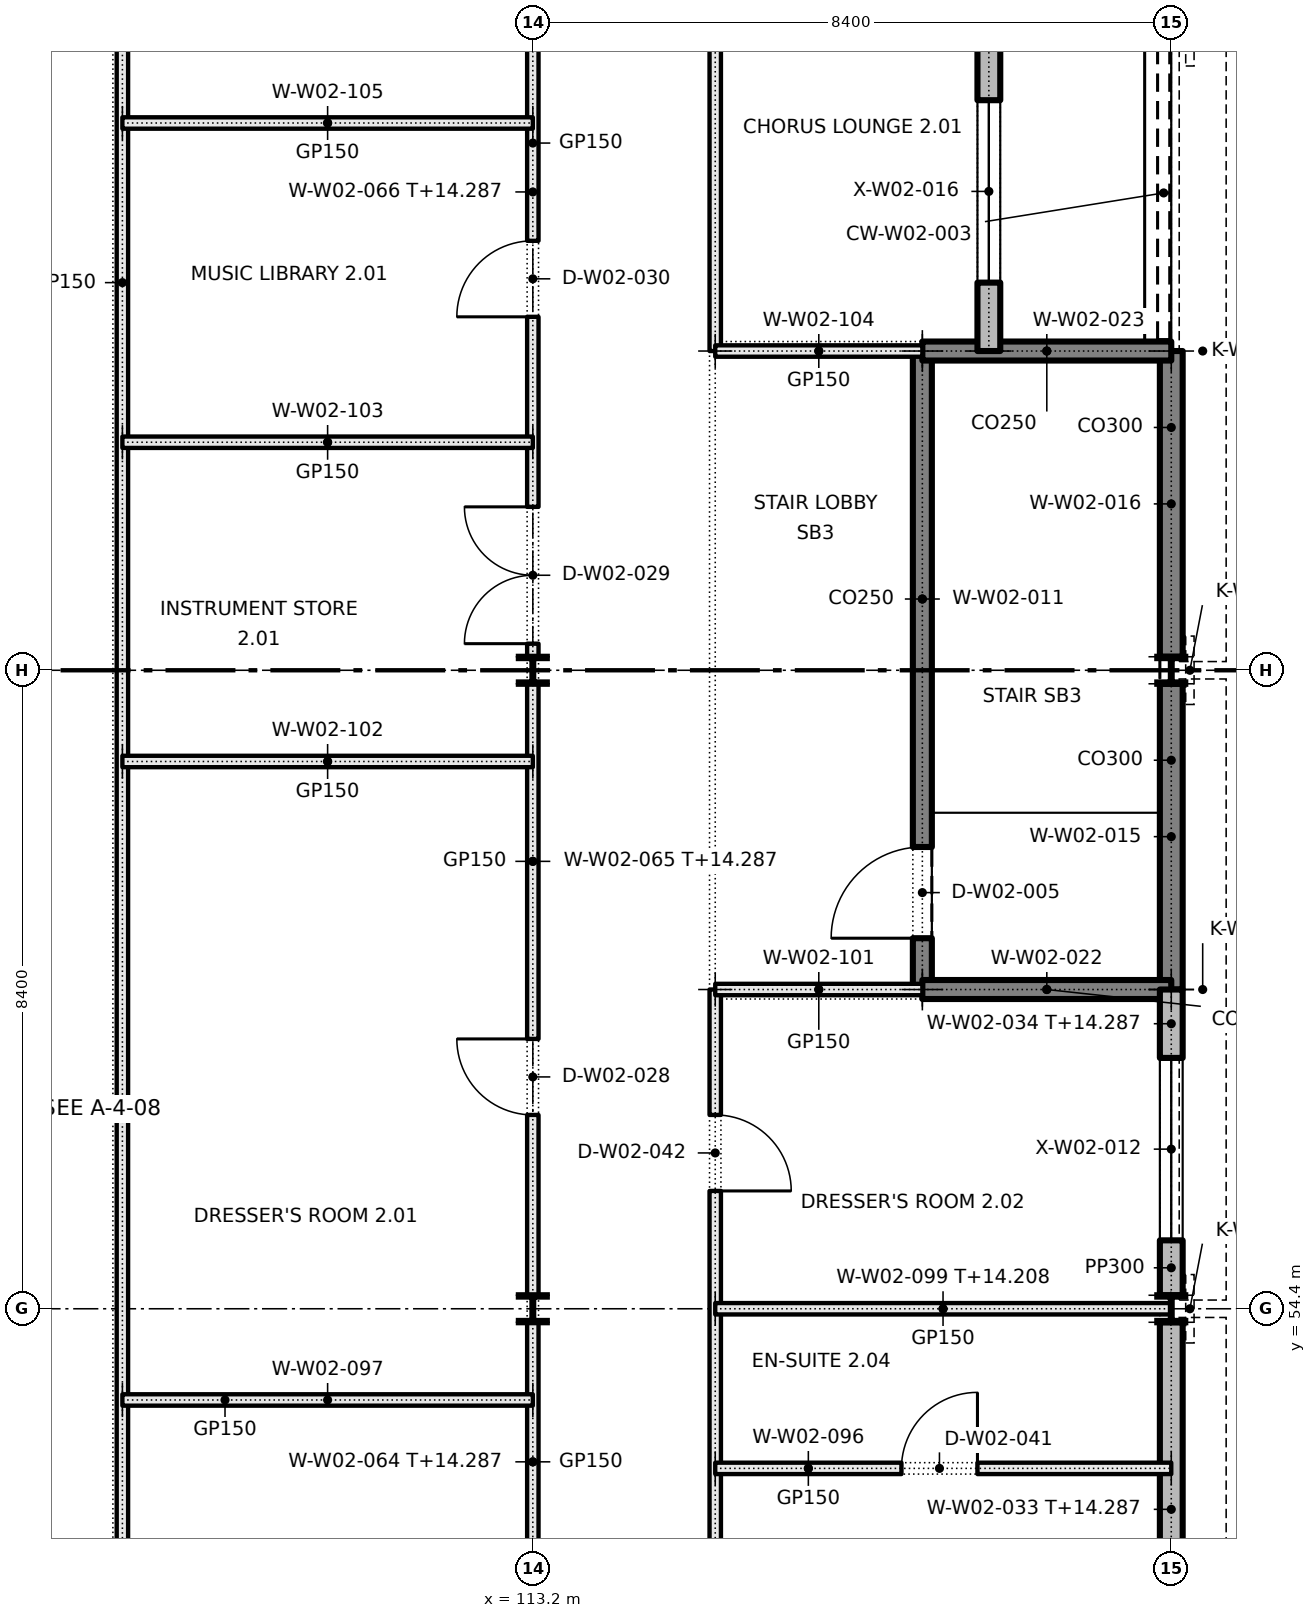
"""IFC4 building model, lengths in metres.
Left out: names, types, materials, properties, quantities, classifications, styles, units other than length and angle.
Written with IfcOpenShell. Run it as: python <this file> out.ifc"""

import sys

from ifc_helpers import new_model, si_unit, direction, frame, frame_2d, origin, origin_2d, place, context, subcontext, project, spatial, rectangle, i_section, extrude, element, fill, save


model = new_model("IFC4")
c1 = context("Model", 3, precision=1e-05, world=origin(), true_north=direction((0.0, 1.0)))
c2 = subcontext(c1, "Body", "Model", "MODEL_VIEW")
j1 = project(units=[si_unit("LENGTHUNIT", "METRE"), si_unit("PLANEANGLEUNIT", "RADIAN")], contexts=[c1])
p1 = place(None, origin())
s1 = spatial("IfcSite", under=j1, at=p1, CompositionType="ELEMENT")
p2 = place(p1, origin())
s2 = spatial("IfcBuilding", under=s1, at=p2, CompositionType="ELEMENT")
p3 = place(p2, frame((0.0, 0.0, 10.2)))
s3 = spatial("IfcBuildingStorey", under=s2, at=p3, CompositionType="ELEMENT", Elevation=10.2)
for number, where, z_axis, x_axis in (
    (1, (113.2, 54.4, 0.0), (0.0, 0.0, 1.0), (1.0, 0.0, 0.0)),
    (2, (113.2, 62.8, 0.0), (0.0, 0.0, 1.0), (1.0, 0.0, 0.0)),
    (3, (121.6, 54.4, 0.0), (0.0, 0.0, 1.0), (1.0, 0.0, 0.0)),
    (4, (121.6, 62.8, 0.0), (0.0, 0.0, 1.0), (1.0, 0.0, 0.0)),
):
    element("IfcColumn", number, at=place(p3, frame(where, z_axis=z_axis, x_axis=x_axis)), inside=s3, PredefinedType="COLUMN", context=c2, shape_type="SweptSolid", body=[
        extrude(i_section(OverallWidth=0.368, OverallDepth=0.356, WebThickness=0.011, FlangeThickness=0.018, FilletRadius=0.015, at=origin_2d()), origin(), (0.0, 0.0, 1.0), 4.8),
    ])
p4 = place(p3, frame((118.325, 58.6, 0.0), z_axis=(0.0, 0.0, 1.0), x_axis=(0.0, 1.0, 0.0)))
e5 = element("IfcWall", 5, at=p4, inside=s3, PredefinedType="SHEAR", context=c2, shape_type="SweptSolid", body=[
    extrude(rectangle(XDim=8.4, YDim=0.25, at=frame_2d((4.2, 0.0))), origin(), (0.0, 0.0, 1.0), 4.8),
])
p5 = place(p4, frame((0.675, 0.0, 0.0)))
e6 = element("IfcOpeningElement", 6, at=p5, cuts=e5, PredefinedType="OPENING", context=c2, shape_type="SweptSolid", body=[
    extrude(rectangle(XDim=1.2, YDim=2.1, at=frame_2d((0.6, 1.05))), frame((0.0, 0.135, 0.0), z_axis=(0.0, -1.0, 0.0), x_axis=(1.0, 0.0, 0.0)), (0.0, 0.0, 1.0), 0.27),
])
for number, where, z_axis, x_axis in (
    (7, (121.6, 58.6, 0.0), (0.0, 0.0, 1.0), (0.0, 1.0, 0.0)),
    (8, (121.6, 62.978, 0.0), (0.0, 0.0, 1.0), (0.0, 1.0, 0.0)),
):
    element("IfcWall", number, at=place(p3, frame(where, z_axis=z_axis, x_axis=x_axis)), inside=s3, PredefinedType="SHEAR", context=c2, shape_type="SweptSolid", body=[
        extrude(rectangle(XDim=4.022, YDim=0.3, at=frame_2d((2.011, 0.0))), origin(), (0.0, 0.0, 1.0), 4.8),
    ])
for number, where, z_axis, x_axis in (
    (9, (118.325, 58.6, 0.0), (0.0, 0.0, 1.0), (1.0, 0.0, 0.0)),
    (10, (118.325, 67.0, 0.0), (0.0, 0.0, 1.0), (1.0, 0.0, 0.0)),
):
    element("IfcWall", number, at=place(p3, frame(where, z_axis=z_axis, x_axis=x_axis)), inside=s3, PredefinedType="SHEAR", context=c2, shape_type="SweptSolid", body=[
        extrude(rectangle(XDim=3.275, YDim=0.25, at=frame_2d((1.638, 0.0))), origin(), (0.0, 0.0, 1.0), 4.8),
    ])
p6 = place(p3, frame((121.6, 46.178, 0.0), z_axis=(0.0, 0.0, 1.0), x_axis=(0.0, 1.0, 0.0)))
e11 = element("IfcWall", 11, at=p6, inside=s3, PredefinedType="SOLIDWALL", context=c2, shape_type="SweptSolid", body=[
    extrude(rectangle(XDim=8.044, YDim=0.3, at=frame_2d((4.022, 0.0))), origin(), (0.0, 0.0, 1.0), 4.087),
])
p7 = place(p6, frame((0.722, 0.0, 0.95)))
e12 = element("IfcOpeningElement", 12, at=p7, cuts=e11, PredefinedType="OPENING", context=c2, shape_type="SweptSolid", body=[
    extrude(rectangle(XDim=2.4, YDim=1.8, at=frame_2d((1.2, 0.9))), frame((0.0, 0.16, 0.0), z_axis=(0.0, -1.0, 0.0), x_axis=(1.0, 0.0, 0.0)), (0.0, 0.0, 1.0), 0.32),
])
p8 = place(p3, frame((121.6, 54.578, 0.0), z_axis=(0.0, 0.0, 1.0), x_axis=(0.0, 1.0, 0.0)))
e13 = element("IfcWall", 13, at=p8, inside=s3, PredefinedType="SOLIDWALL", context=c2, shape_type="SweptSolid", body=[
    extrude(rectangle(XDim=4.022, YDim=0.3, at=frame_2d((2.011, 0.0))), origin(), (0.0, 0.0, 1.0), 4.087),
])
p9 = place(p8, frame((0.722, 0.0, 0.95)))
e14 = element("IfcOpeningElement", 14, at=p9, cuts=e13, PredefinedType="OPENING", context=c2, shape_type="SweptSolid", body=[
    extrude(rectangle(XDim=2.4, YDim=1.8, at=frame_2d((1.2, 0.9))), frame((0.0, 0.16, 0.0), z_axis=(0.0, -1.0, 0.0), x_axis=(1.0, 0.0, 0.0)), (0.0, 0.0, 1.0), 0.32),
])
p10 = place(p3, frame((107.8, 36.4, 0.0), z_axis=(0.0, 0.0, 1.0), x_axis=(0.0, 1.0, 0.0)))
e15 = element("IfcWall", 15, at=p10, inside=s3, PredefinedType="PARTITIONING", context=c2, shape_type="SweptSolid", body=[
    extrude(rectangle(XDim=42.0, YDim=0.15, at=frame_2d((21.0, 0.0))), origin(), (0.0, 0.0, 1.0), 4.8),
])
p11 = place(p3, frame((113.2, 46.178, 0.0), z_axis=(0.0, 0.0, 1.0), x_axis=(0.0, 1.0, 0.0)))
e16 = element("IfcWall", 16, at=p11, inside=s3, PredefinedType="PARTITIONING", context=c2, shape_type="SweptSolid", body=[
    extrude(rectangle(XDim=8.044, YDim=0.15, at=frame_2d((4.022, 0.0))), origin(), (0.0, 0.0, 1.0), 4.087),
])
p12 = place(p11, frame((3.372, 0.0, 0.0)))
e17 = element("IfcOpeningElement", 17, at=p12, cuts=e16, PredefinedType="OPENING", context=c2, shape_type="SweptSolid", body=[
    extrude(rectangle(XDim=1.0, YDim=2.1, at=frame_2d((0.5, 1.05))), frame((0.0, 0.085, 0.0), z_axis=(0.0, -1.0, 0.0), x_axis=(1.0, 0.0, 0.0)), (0.0, 0.0, 1.0), 0.17),
])
p13 = place(p3, frame((113.2, 54.578, 0.0), z_axis=(0.0, 0.0, 1.0), x_axis=(0.0, 1.0, 0.0)))
e18 = element("IfcWall", 18, at=p13, inside=s3, PredefinedType="PARTITIONING", context=c2, shape_type="SweptSolid", body=[
    extrude(rectangle(XDim=8.044, YDim=0.15, at=frame_2d((4.022, 0.0))), origin(), (0.0, 0.0, 1.0), 4.087),
])
p14 = place(p13, frame((2.372, 0.0, 0.0)))
e19 = element("IfcOpeningElement", 19, at=p14, cuts=e18, PredefinedType="OPENING", context=c2, shape_type="SweptSolid", body=[
    extrude(rectangle(XDim=1.0, YDim=2.1, at=frame_2d((0.5, 1.05))), frame((0.0, 0.085, 0.0), z_axis=(0.0, -1.0, 0.0), x_axis=(1.0, 0.0, 0.0)), (0.0, 0.0, 1.0), 0.17),
])
p15 = place(p3, frame((113.2, 62.978, 0.0), z_axis=(0.0, 0.0, 1.0), x_axis=(0.0, 1.0, 0.0)))
e20 = element("IfcWall", 20, at=p15, inside=s3, PredefinedType="PARTITIONING", context=c2, shape_type="SweptSolid", body=[
    extrude(rectangle(XDim=8.044, YDim=0.15, at=frame_2d((4.022, 0.0))), origin(), (0.0, 0.0, 1.0), 4.087),
])
p16 = place(p15, frame((0.172, 0.0, 0.0)))
e21 = element("IfcOpeningElement", 21, at=p16, cuts=e20, PredefinedType="OPENING", context=c2, shape_type="SweptSolid", body=[
    extrude(rectangle(XDim=1.8, YDim=2.1, at=frame_2d((0.9, 1.05))), frame((0.0, 0.085, 0.0), z_axis=(0.0, -1.0, 0.0), x_axis=(1.0, 0.0, 0.0)), (0.0, 0.0, 1.0), 0.17),
])
p17 = place(p15, frame((4.472, 0.0, 0.0)))
e22 = element("IfcOpeningElement", 22, at=p17, cuts=e20, PredefinedType="OPENING", context=c2, shape_type="SweptSolid", body=[
    extrude(rectangle(XDim=1.0, YDim=2.1, at=frame_2d((0.5, 1.05))), frame((0.0, 0.085, 0.0), z_axis=(0.0, -1.0, 0.0), x_axis=(1.0, 0.0, 0.0)), (0.0, 0.0, 1.0), 0.17),
])
p18 = place(p3, frame((115.6, 37.6, 0.0), z_axis=(0.0, 0.0, 1.0), x_axis=(0.0, 1.0, 0.0)))
e23 = element("IfcWall", 23, at=p18, inside=s3, PredefinedType="PARTITIONING", context=c2, shape_type="SweptSolid", body=[
    extrude(rectangle(XDim=21.0, YDim=0.15, at=frame_2d((10.5, 0.0))), origin(), (0.0, 0.0, 1.0), 4.8),
])
p19 = place(p18, frame((2.65, 0.0, 0.0)))
e24 = element("IfcOpeningElement", 24, at=p19, cuts=e23, PredefinedType="OPENING", context=c2, shape_type="SweptSolid", body=[
    extrude(rectangle(XDim=1.0, YDim=2.1, at=frame_2d((0.5, 1.05))), frame((0.0, 0.085, 0.0), z_axis=(0.0, -1.0, 0.0), x_axis=(1.0, 0.0, 0.0)), (0.0, 0.0, 1.0), 0.17),
])
p20 = place(p18, frame((11.05, 0.0, 0.0)))
e25 = element("IfcOpeningElement", 25, at=p20, cuts=e23, PredefinedType="OPENING", context=c2, shape_type="SweptSolid", body=[
    extrude(rectangle(XDim=1.0, YDim=2.1, at=frame_2d((0.5, 1.05))), frame((0.0, 0.085, 0.0), z_axis=(0.0, -1.0, 0.0), x_axis=(1.0, 0.0, 0.0)), (0.0, 0.0, 1.0), 0.17),
])
p21 = place(p18, frame((18.35, 0.0, 0.0)))
e26 = element("IfcOpeningElement", 26, at=p21, cuts=e23, PredefinedType="OPENING", context=c2, shape_type="SweptSolid", body=[
    extrude(rectangle(XDim=1.0, YDim=2.1, at=frame_2d((0.5, 1.05))), frame((0.0, 0.085, 0.0), z_axis=(0.0, -1.0, 0.0), x_axis=(1.0, 0.0, 0.0)), (0.0, 0.0, 1.0), 0.17),
])
p22 = place(p3, frame((115.6, 67.0, 0.0), z_axis=(0.0, 0.0, 1.0), x_axis=(0.0, 1.0, 0.0)))
e27 = element("IfcWall", 27, at=p22, inside=s3, PredefinedType="PARTITIONING", context=c2, shape_type="SweptSolid", body=[
    extrude(rectangle(XDim=21.0, YDim=0.15, at=frame_2d((10.5, 0.0))), origin(), (0.0, 0.0, 1.0), 4.8),
])
p23 = place(p22, frame((9.95, 0.0, 0.0)))
e28 = element("IfcOpeningElement", 28, at=p23, cuts=e27, PredefinedType="OPENING", context=c2, shape_type="SweptSolid", body=[
    extrude(rectangle(XDim=1.0, YDim=2.1, at=frame_2d((0.5, 1.05))), frame((0.0, 0.085, 0.0), z_axis=(0.0, -1.0, 0.0), x_axis=(1.0, 0.0, 0.0)), (0.0, 0.0, 1.0), 0.17),
])
p24 = place(p3, frame((119.2, 67.0, 0.0), z_axis=(0.0, 0.0, 1.0), x_axis=(0.0, 1.0, 0.0)))
e29 = element("IfcWall", 29, at=p24, inside=s3, PredefinedType="SOLIDWALL", context=c2, shape_type="SweptSolid", body=[
    extrude(rectangle(XDim=21.0, YDim=0.3, at=frame_2d((10.5, 0.0))), origin(), (0.0, 0.0, 1.0), 4.8),
])
p25 = place(p24, frame((9.55, 0.0, 0.0)))
e30 = element("IfcOpeningElement", 30, at=p25, cuts=e29, PredefinedType="OPENING", context=c2, shape_type="SweptSolid", body=[
    extrude(rectangle(XDim=1.8, YDim=2.1, at=frame_2d((0.9, 1.05))), frame((0.0, 0.16, 0.0), z_axis=(0.0, -1.0, 0.0), x_axis=(1.0, 0.0, 0.0)), (0.0, 0.0, 1.0), 0.32),
])
p26 = place(p24, frame((0.9, 0.0, 0.95)))
e31 = element("IfcOpeningElement", 31, at=p26, cuts=e29, PredefinedType="OPENING", context=c2, shape_type="SweptSolid", body=[
    extrude(rectangle(XDim=2.4, YDim=1.8, at=frame_2d((1.2, 0.9))), frame((0.0, 0.16, 0.0), z_axis=(0.0, -1.0, 0.0), x_axis=(1.0, 0.0, 0.0)), (0.0, 0.0, 1.0), 0.32),
])
p27 = place(p24, frame((5.1, 0.0, 0.95)))
e32 = element("IfcOpeningElement", 32, at=p27, cuts=e29, PredefinedType="OPENING", context=c2, shape_type="SweptSolid", body=[
    extrude(rectangle(XDim=2.4, YDim=1.8, at=frame_2d((1.2, 0.9))), frame((0.0, 0.16, 0.0), z_axis=(0.0, -1.0, 0.0), x_axis=(1.0, 0.0, 0.0)), (0.0, 0.0, 1.0), 0.32),
])
p28 = place(p24, frame((13.5, 0.0, 0.95)))
e33 = element("IfcOpeningElement", 33, at=p28, cuts=e29, PredefinedType="OPENING", context=c2, shape_type="SweptSolid", body=[
    extrude(rectangle(XDim=2.4, YDim=1.8, at=frame_2d((1.2, 0.9))), frame((0.0, 0.16, 0.0), z_axis=(0.0, -1.0, 0.0), x_axis=(1.0, 0.0, 0.0)), (0.0, 0.0, 1.0), 0.32),
])
p29 = place(p24, frame((17.7, 0.0, 0.95)))
e34 = element("IfcOpeningElement", 34, at=p29, cuts=e29, PredefinedType="OPENING", context=c2, shape_type="SweptSolid", body=[
    extrude(rectangle(XDim=2.4, YDim=1.8, at=frame_2d((1.2, 0.9))), frame((0.0, 0.16, 0.0), z_axis=(0.0, -1.0, 0.0), x_axis=(1.0, 0.0, 0.0)), (0.0, 0.0, 1.0), 0.32),
])
p30 = place(p3, frame((115.6, 52.3, 0.0), z_axis=(0.0, 0.0, 1.0), x_axis=(1.0, 0.0, 0.0)))
e35 = element("IfcWall", 35, at=p30, inside=s3, PredefinedType="PARTITIONING", context=c2, shape_type="SweptSolid", body=[
    extrude(rectangle(XDim=6.0, YDim=0.15, at=frame_2d((3.0, 0.0))), origin(), (0.0, 0.0, 1.0), 4.8),
])
p31 = place(p30, frame((2.45, 0.0, 0.0)))
e36 = element("IfcOpeningElement", 36, at=p31, cuts=e35, PredefinedType="OPENING", context=c2, shape_type="SweptSolid", body=[
    extrude(rectangle(XDim=1.0, YDim=2.1, at=frame_2d((0.5, 1.05))), frame((0.0, 0.085, 0.0), z_axis=(0.0, -1.0, 0.0), x_axis=(1.0, 0.0, 0.0)), (0.0, 0.0, 1.0), 0.17),
])
p32 = place(p3, frame((107.8, 53.2, 0.0), z_axis=(0.0, 0.0, 1.0), x_axis=(1.0, 0.0, 0.0)))
e37 = element("IfcWall", 37, at=p32, inside=s3, PredefinedType="PARTITIONING", context=c2, shape_type="SweptSolid", body=[
    extrude(rectangle(XDim=5.4, YDim=0.15, at=frame_2d((2.7, 0.0))), origin(), (0.0, 0.0, 1.0), 4.8),
])
p33 = place(p3, frame((115.6, 54.4, 0.0), z_axis=(0.0, 0.0, 1.0), x_axis=(1.0, 0.0, 0.0)))
e38 = element("IfcWall", 38, at=p33, inside=s3, PredefinedType="PARTITIONING", context=c2, shape_type="SweptSolid", body=[
    extrude(rectangle(XDim=5.994, YDim=0.15, at=frame_2d((2.997, 0.0))), origin(), (0.0, 0.0, 1.0), 4.008),
])
p34 = place(p3, frame((115.6, 58.6, 0.0), z_axis=(0.0, 0.0, 1.0), x_axis=(1.0, 0.0, 0.0)))
e39 = element("IfcWall", 39, at=p34, inside=s3, PredefinedType="PARTITIONING", context=c2, shape_type="SweptSolid", body=[
    extrude(rectangle(XDim=2.725, YDim=0.15, at=frame_2d((1.362, 0.0))), origin(), (0.0, 0.0, 1.0), 4.8),
])
for number, where, z_axis, x_axis in (
    (40, (107.8, 61.6, 0.0), (0.0, 0.0, 1.0), (1.0, 0.0, 0.0)),
    (41, (107.8, 65.8, 0.0), (0.0, 0.0, 1.0), (1.0, 0.0, 0.0)),
):
    element("IfcWall", number, at=place(p3, frame(where, z_axis=z_axis, x_axis=x_axis)), inside=s3, PredefinedType="PARTITIONING", context=c2, shape_type="SweptSolid", body=[
        extrude(rectangle(XDim=5.4, YDim=0.15, at=frame_2d((2.7, 0.0))), origin(), (0.0, 0.0, 1.0), 4.8),
    ])
p35 = place(p3, frame((115.6, 67.0, 0.0), z_axis=(0.0, 0.0, 1.0), x_axis=(1.0, 0.0, 0.0)))
e42 = element("IfcWall", 42, at=p35, inside=s3, PredefinedType="PARTITIONING", context=c2, shape_type="SweptSolid", body=[
    extrude(rectangle(XDim=2.725, YDim=0.15, at=frame_2d((1.362, 0.0))), origin(), (0.0, 0.0, 1.0), 4.8),
])
p36 = place(p3, frame((107.8, 70.0, 0.0), z_axis=(0.0, 0.0, 1.0), x_axis=(1.0, 0.0, 0.0)))
e43 = element("IfcWall", 43, at=p36, inside=s3, PredefinedType="PARTITIONING", context=c2, shape_type="SweptSolid", body=[
    extrude(rectangle(XDim=5.4, YDim=0.15, at=frame_2d((2.7, 0.0))), origin(), (0.0, 0.0, 1.0), 4.8),
])
p37 = place(p9, origin())
e44 = element("IfcWindow", 44, at=p37, inside=s3, PartitioningType="DOUBLE_PANEL_VERTICAL", PredefinedType="WINDOW", context=c2, shape_type="SweptSolid", body=[
    extrude(rectangle(XDim=2.4, YDim=1.8, at=frame_2d((1.2, 0.9))), frame((0.0, 0.03, 0.0), z_axis=(0.0, -1.0, 0.0), x_axis=(1.0, 0.0, 0.0)), (0.0, 0.0, 1.0), 0.06),
])
fill(e14, e44)
p38 = place(p5, origin())
e45 = element("IfcDoor", 45, at=p38, inside=s3, OperationType="SINGLE_SWING_LEFT", PredefinedType="DOOR", context=c2, shape_type="SweptSolid", body=[
    extrude(rectangle(XDim=1.2, YDim=2.1, at=frame_2d((0.6, 1.05))), frame((0.0, 0.025, 0.0), z_axis=(0.0, -1.0, 0.0), x_axis=(1.0, 0.0, 0.0)), (0.0, 0.0, 1.0), 0.05),
])
fill(e6, e45)
p39 = place(p14, origin())
e46 = element("IfcDoor", 46, at=p39, inside=s3, OperationType="SINGLE_SWING_RIGHT", PredefinedType="DOOR", context=c2, shape_type="SweptSolid", body=[
    extrude(rectangle(XDim=1.0, YDim=2.1, at=frame_2d((0.5, 1.05))), frame((0.0, 0.025, 0.0), z_axis=(0.0, -1.0, 0.0), x_axis=(1.0, 0.0, 0.0)), (0.0, 0.0, 1.0), 0.05),
])
fill(e19, e46)
p40 = place(p16, origin())
e47 = element("IfcDoor", 47, at=p40, inside=s3, OperationType="DOUBLE_DOOR_SINGLE_SWING", PredefinedType="DOOR", context=c2, shape_type="SweptSolid", body=[
    extrude(rectangle(XDim=1.8, YDim=2.1, at=frame_2d((0.9, 1.05))), frame((0.0, 0.025, 0.0), z_axis=(0.0, -1.0, 0.0), x_axis=(1.0, 0.0, 0.0)), (0.0, 0.0, 1.0), 0.05),
])
fill(e21, e47)
p41 = place(p17, origin())
e48 = element("IfcDoor", 48, at=p41, inside=s3, OperationType="SINGLE_SWING_LEFT", PredefinedType="DOOR", context=c2, shape_type="SweptSolid", body=[
    extrude(rectangle(XDim=1.0, YDim=2.1, at=frame_2d((0.5, 1.05))), frame((0.0, 0.025, 0.0), z_axis=(0.0, -1.0, 0.0), x_axis=(1.0, 0.0, 0.0)), (0.0, 0.0, 1.0), 0.05),
])
fill(e22, e48)
p42 = place(p31, origin())
e49 = element("IfcDoor", 49, at=p42, inside=s3, OperationType="SINGLE_SWING_RIGHT", PredefinedType="DOOR", context=c2, shape_type="SweptSolid", body=[
    extrude(rectangle(XDim=1.0, YDim=2.1, at=frame_2d((0.5, 1.05))), frame((0.0, 0.025, 0.0), z_axis=(0.0, -1.0, 0.0), x_axis=(1.0, 0.0, 0.0)), (0.0, 0.0, 1.0), 0.05),
])
fill(e36, e49)
p43 = place(p21, frame((1.0, 0.0, 0.0), z_axis=(0.0, 0.0, 1.0), x_axis=(-1.0, 0.0, 0.0)))
e50 = element("IfcDoor", 50, at=p43, inside=s3, OperationType="SINGLE_SWING_RIGHT", PredefinedType="DOOR", context=c2, shape_type="SweptSolid", body=[
    extrude(rectangle(XDim=1.0, YDim=2.1, at=frame_2d((0.5, 1.05))), frame((0.0, 0.025, 0.0), z_axis=(0.0, -1.0, 0.0), x_axis=(1.0, 0.0, 0.0)), (0.0, 0.0, 1.0), 0.05),
])
fill(e26, e50)
p44 = place(p26, origin())
e51 = element("IfcWindow", 51, at=p44, inside=s3, PartitioningType="DOUBLE_PANEL_VERTICAL", PredefinedType="WINDOW", context=c2, shape_type="SweptSolid", body=[
    extrude(rectangle(XDim=2.4, YDim=1.8, at=frame_2d((1.2, 0.9))), frame((0.0, 0.03, 0.0), z_axis=(0.0, -1.0, 0.0), x_axis=(1.0, 0.0, 0.0)), (0.0, 0.0, 1.0), 0.06),
])
fill(e31, e51)
save(model, sys.argv[1])
